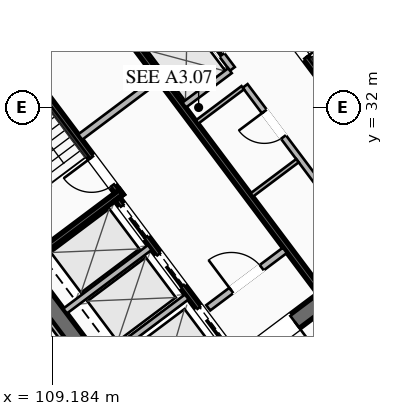
"""IFC4 building model, lengths in metres.
Left out: names, types, materials, properties, quantities, classifications, styles, units other than length and angle.
Written with IfcOpenShell. Run it as: python <this file> out.ifc"""

import sys

from ifc_helpers import new_model, si_unit, direction, frame, frame_2d, origin, place, context, subcontext, project, spatial, rectangle, extrude, element, fill, save


model = new_model("IFC4")
c1 = context("Model", 3, precision=1e-05, world=origin(), true_north=direction((0.0, 1.0)))
c2 = subcontext(c1, "Body", "Model", "MODEL_VIEW")
j1 = project(units=[si_unit("LENGTHUNIT", "METRE"), si_unit("PLANEANGLEUNIT", "RADIAN")], contexts=[c1])
p1 = place(None, origin())
s1 = spatial("IfcSite", under=j1, at=p1, CompositionType="ELEMENT")
p2 = place(p1, origin())
s2 = spatial("IfcBuilding", under=s1, at=p2, CompositionType="ELEMENT")
p3 = place(p2, frame((0.0, 0.0, 178.3)))
s3 = spatial("IfcBuildingStorey", under=s2, at=p3, CompositionType="ELEMENT", Elevation=178.3)
for number, where, z_axis, x_axis in (
    (1, (112.436, 21.077, 0.0), (0.0, 0.0, 1.0), (-0.6, 0.8, 0.0)),
    (2, (115.564, 42.923, 0.0), (0.0, 0.0, 1.0), (0.6, -0.8, 0.0)),
):
    element("IfcWall", number, at=place(p3, frame(where, z_axis=z_axis, x_axis=x_axis)), inside=s3, PredefinedType="SHEAR", context=c2, shape_type="SweptSolid", body=[
        extrude(rectangle(XDim=15.6, YDim=0.55, at=frame_2d((7.8, 0.0))), origin(), (0.0, 0.0, 1.0), 3.55),
    ])
p4 = place(p3, frame((124.539, 30.498, 0.0), z_axis=(0.0, 0.0, 1.0), x_axis=(-0.799998054672, -0.600002593761, 0.0)))
e3 = element("IfcWall", 3, at=p4, inside=s3, PredefinedType="SHEAR", context=c2, shape_type="SweptSolid", body=[
    extrude(rectangle(XDim=15.06, YDim=0.55, at=frame_2d((7.53, 0.0))), origin(), (0.0, 0.0, 1.0), 3.55),
])
p5 = place(p4, frame((9.23, 0.0, 0.0)))
e4 = element("IfcOpeningElement", 4, at=p5, cuts=e3, PredefinedType="OPENING", context=c2, shape_type="SweptSolid", body=[
    extrude(rectangle(XDim=1.25, YDim=2.25, at=frame_2d((0.625, 1.125))), frame((0.0, 0.285, 0.0), z_axis=(0.0, -1.0, 0.0), x_axis=(1.0, 0.0, 0.0)), (0.0, 0.0, 1.0), 0.57),
])
p6 = place(p4, frame((4.18, 0.0, 0.0)))
e5 = element("IfcOpeningElement", 5, at=p6, cuts=e3, PredefinedType="OPENING", context=c2, shape_type="SweptSolid", body=[
    extrude(rectangle(XDim=1.25, YDim=2.25, at=frame_2d((0.625, 1.125))), frame((0.0, 0.285, 0.0), z_axis=(0.0, -1.0, 0.0), x_axis=(1.0, 0.0, 0.0)), (0.0, 0.0, 1.0), 0.57),
])
p7 = place(p3, frame((103.461, 33.502, 0.0), z_axis=(0.0, 0.0, 1.0), x_axis=(0.799998054672, 0.600002593761, 0.0)))
e6 = element("IfcWall", 6, at=p7, inside=s3, PredefinedType="SHEAR", context=c2, shape_type="SweptSolid", body=[
    extrude(rectangle(XDim=15.06, YDim=0.55, at=frame_2d((7.53, 0.0))), origin(), (0.0, 0.0, 1.0), 3.55),
])
p8 = place(p7, frame((4.58, 0.0, 0.0)))
e7 = element("IfcOpeningElement", 7, at=p8, cuts=e6, PredefinedType="OPENING", context=c2, shape_type="SweptSolid", body=[
    extrude(rectangle(XDim=1.25, YDim=2.25, at=frame_2d((0.625, 1.125))), frame((0.0, 0.285, 0.0), z_axis=(0.0, -1.0, 0.0), x_axis=(1.0, 0.0, 0.0)), (0.0, 0.0, 1.0), 0.57),
])
p9 = place(p7, frame((9.63, 0.0, 0.0)))
e8 = element("IfcOpeningElement", 8, at=p9, cuts=e6, PredefinedType="OPENING", context=c2, shape_type="SweptSolid", body=[
    extrude(rectangle(XDim=1.25, YDim=2.25, at=frame_2d((0.625, 1.125))), frame((0.0, 0.285, 0.0), z_axis=(0.0, -1.0, 0.0), x_axis=(1.0, 0.0, 0.0)), (0.0, 0.0, 1.0), 0.57),
])
p10 = place(p3, frame((111.44, 29.08, 0.0), z_axis=(0.0, 0.0, 1.0), x_axis=(-0.59999029481, 0.8000072788, 0.0)))
e9 = element("IfcWall", 9, at=p10, inside=s3, PredefinedType="SHEAR", context=c2, shape_type="SweptSolid", body=[
    extrude(rectangle(XDim=8.05, YDim=0.2, at=frame_2d((4.025, 0.0))), origin(), (0.0, 0.0, 1.0), 3.37),
])
p11 = place(p10, frame((0.45, 0.0, 0.0)))
e10 = element("IfcOpeningElement", 10, at=p11, cuts=e9, PredefinedType="OPENING", context=c2, shape_type="SweptSolid", body=[
    extrude(rectangle(XDim=1.15, YDim=2.2, at=frame_2d((0.575, 1.1))), frame((0.0, 0.11, 0.0), z_axis=(0.0, -1.0, 0.0), x_axis=(1.0, 0.0, 0.0)), (0.0, 0.0, 1.0), 0.22),
])
p12 = place(p3, frame((108.396, 26.922, 0.0), z_axis=(0.0, 0.0, 1.0), x_axis=(0.800015298837, 0.599979601008, 0.0)))
e11 = element("IfcWall", 11, at=p12, inside=s3, PredefinedType="SHEAR", context=c2, shape_type="SweptSolid", body=[
    extrude(rectangle(XDim=3.83, YDim=0.2, at=frame_2d((1.915, 0.0))), origin(), (0.0, 0.0, 1.0), 3.37),
])
p13 = place(p3, frame((116.56, 34.92, 0.0), z_axis=(0.0, 0.0, 1.0), x_axis=(0.59999029481, -0.8000072788, 0.0)))
e12 = element("IfcWall", 12, at=p13, inside=s3, PredefinedType="SHEAR", context=c2, shape_type="SweptSolid", body=[
    extrude(rectangle(XDim=8.05, YDim=0.2, at=frame_2d((4.025, 0.0))), origin(), (0.0, 0.0, 1.0), 3.37),
])
p14 = place(p13, frame((0.45, 0.0, 0.0)))
e13 = element("IfcOpeningElement", 13, at=p14, cuts=e12, PredefinedType="OPENING", context=c2, shape_type="SweptSolid", body=[
    extrude(rectangle(XDim=1.15, YDim=2.2, at=frame_2d((0.575, 1.1))), frame((0.0, 0.11, 0.0), z_axis=(0.0, -1.0, 0.0), x_axis=(1.0, 0.0, 0.0)), (0.0, 0.0, 1.0), 0.22),
])
p15 = place(p3, frame((117.998, 25.936, 0.0), z_axis=(0.0, 0.0, 1.0), x_axis=(-0.600002693989, 0.799997979501, 0.0)))
e14 = element("IfcWall", 14, at=p15, inside=s3, PredefinedType="SHEAR", context=c2, shape_type="SweptSolid", body=[
    extrude(rectangle(XDim=14.5, YDim=0.2, at=frame_2d((7.25, 0.0))), origin(), (0.0, 0.0, 1.0), 3.37),
])
p16 = place(p3, frame((110.104, 31.028, 0.0), z_axis=(0.0, 0.0, 1.0), x_axis=(0.800018601094, 0.59997519774, 0.0)))
e15 = element("IfcWall", 15, at=p16, inside=s3, PredefinedType="SOLIDWALL", context=c2, shape_type="SweptSolid", body=[
    extrude(rectangle(XDim=3.15, YDim=0.22, at=frame_2d((1.575, 0.0))), origin(), (0.0, 0.0, 1.0), 2.723),
])
p17 = place(p3, frame((114.316, 25.412, 0.0), z_axis=(0.0, 0.0, 1.0), x_axis=(0.800018601094, 0.59997519774, 0.0)))
e16 = element("IfcWall", 16, at=p17, inside=s3, PredefinedType="SOLIDWALL", context=c2, shape_type="SweptSolid", body=[
    extrude(rectangle(XDim=3.15, YDim=0.22, at=frame_2d((1.575, 0.0))), origin(), (0.0, 0.0, 1.0), 2.723),
])
p18 = place(p17, frame((0.95, 0.0, 0.0)))
e17 = element("IfcOpeningElement", 17, at=p18, cuts=e16, PredefinedType="OPENING", context=c2, shape_type="SweptSolid", body=[
    extrude(rectangle(XDim=1.25, YDim=2.25, at=frame_2d((0.625, 1.125))), frame((0.0, 0.12, 0.0), z_axis=(0.0, -1.0, 0.0), x_axis=(1.0, 0.0, 0.0)), (0.0, 0.0, 1.0), 0.24),
])
p19 = place(p3, frame((115.19, 23.83, 0.0), z_axis=(0.0, 0.0, 1.0), x_axis=(-0.599993943644, 0.800004542231, 0.0)))
e18 = element("IfcWall", 18, at=p19, inside=s3, PredefinedType="SHEAR", context=c2, shape_type="SweptSolid", body=[
    extrude(rectangle(XDim=6.45, YDim=0.2, at=frame_2d((3.225, 0.0))), origin(), (0.0, 0.0, 1.0), 3.37),
])
p20 = place(p19, frame((4.875, 0.0, 0.0)))
e19 = element("IfcOpeningElement", 19, at=p20, cuts=e18, PredefinedType="OPENING", context=c2, shape_type="SweptSolid", body=[
    extrude(rectangle(XDim=1.3, YDim=2.25, at=frame_2d((0.65, 1.125))), frame((0.0, 0.11, 0.0), z_axis=(0.0, -1.0, 0.0), x_axis=(1.0, 0.0, 0.0)), (0.0, 0.0, 1.0), 0.22),
])
p21 = place(p19, frame((2.875, 0.0, 0.0)))
e20 = element("IfcOpeningElement", 20, at=p21, cuts=e18, PredefinedType="OPENING", context=c2, shape_type="SweptSolid", body=[
    extrude(rectangle(XDim=1.3, YDim=2.25, at=frame_2d((0.65, 1.125))), frame((0.0, 0.11, 0.0), z_axis=(0.0, -1.0, 0.0), x_axis=(1.0, 0.0, 0.0)), (0.0, 0.0, 1.0), 0.22),
])
p22 = place(p19, frame((0.675, 0.0, 0.0)))
e21 = element("IfcOpeningElement", 21, at=p22, cuts=e18, PredefinedType="OPENING", context=c2, shape_type="SweptSolid", body=[
    extrude(rectangle(XDim=1.3, YDim=2.25, at=frame_2d((0.65, 1.125))), frame((0.0, 0.11, 0.0), z_axis=(0.0, -1.0, 0.0), x_axis=(1.0, 0.0, 0.0)), (0.0, 0.0, 1.0), 0.22),
])
for number, where, z_axis, x_axis in (
    (22, (110.826, 23.682, 0.0), (0.0, 0.0, 1.0), (0.8, 0.6, 0.0)),
    (23, (109.608, 25.306, 0.0), (0.0, 0.0, 1.0), (0.8, 0.6, 0.0)),
):
    element("IfcWall", number, at=place(p3, frame(where, z_axis=z_axis, x_axis=x_axis)), inside=s3, PredefinedType="SOLIDWALL", context=c2, shape_type="SweptSolid", body=[
        extrude(rectangle(XDim=3.48, YDim=0.2, at=frame_2d((1.74, 0.0))), origin(), (0.0, 0.0, 1.0), 3.37),
    ])
p23 = place(p3, frame((119.67, 27.19, 0.0), z_axis=(0.0, 0.0, 1.0), x_axis=(-0.599988677396, 0.800008491828, 0.0)))
e24 = element("IfcWall", 24, at=p23, inside=s3, PredefinedType="SOLIDWALL", context=c2, shape_type="SweptSolid", body=[
    extrude(rectangle(XDim=6.9, YDim=0.2, at=frame_2d((3.45, 0.0))), origin(), (0.0, 0.0, 1.0), 2.723),
])
p24 = place(p23, frame((0.85, 0.0, 0.0)))
e25 = element("IfcOpeningElement", 25, at=p24, cuts=e24, PredefinedType="OPENING", context=c2, shape_type="SweptSolid", body=[
    extrude(rectangle(XDim=0.95, YDim=2.05, at=frame_2d((0.475, 1.025))), frame((0.0, 0.11, 0.0), z_axis=(0.0, -1.0, 0.0), x_axis=(1.0, 0.0, 0.0)), (0.0, 0.0, 1.0), 0.22),
])
p25 = place(p23, frame((4.8, 0.0, 0.0)))
e26 = element("IfcOpeningElement", 26, at=p25, cuts=e24, PredefinedType="OPENING", context=c2, shape_type="SweptSolid", body=[
    extrude(rectangle(XDim=1.05, YDim=2.2, at=frame_2d((0.525, 1.1))), frame((0.0, 0.11, 0.0), z_axis=(0.0, -1.0, 0.0), x_axis=(1.0, 0.0, 0.0)), (0.0, 0.0, 1.0), 0.22),
])
for number, where, z_axis, x_axis in (
    (27, (113.946, 31.522, 0.0), (0.0, 0.0, 1.0), (0.8, 0.6, 0.0)),
    (28, (115.746, 29.122, 0.0), (0.0, 0.0, 1.0), (0.8, 0.6, 0.0)),
):
    element("IfcWall", number, at=place(p3, frame(where, z_axis=z_axis, x_axis=x_axis)), inside=s3, PredefinedType="PARTITIONING", context=c2, shape_type="SweptSolid", body=[
        extrude(rectangle(XDim=1.88, YDim=0.135, at=frame_2d((0.94, 0.0))), origin(), (0.0, 0.0, 1.0), 2.723),
    ])
p26 = place(p3, frame((115.11, 33.27, 0.0), z_axis=(0.0, 0.0, 1.0), x_axis=(-0.600011322243, 0.799991508192, 0.0)))
e29 = element("IfcWall", 29, at=p26, inside=s3, PredefinedType="SOLIDWALL", context=c2, shape_type="SweptSolid", body=[
    extrude(rectangle(XDim=6.9, YDim=0.2, at=frame_2d((3.45, 0.0))), origin(), (0.0, 0.0, 1.0), 3.37),
])
p27 = place(p26, frame((0.575, 0.0, 0.0)))
e30 = element("IfcOpeningElement", 30, at=p27, cuts=e29, PredefinedType="OPENING", context=c2, shape_type="SweptSolid", body=[
    extrude(rectangle(XDim=1.1, YDim=2.2, at=frame_2d((0.55, 1.1))), frame((0.0, 0.11, 0.0), z_axis=(0.0, -1.0, 0.0), x_axis=(1.0, 0.0, 0.0)), (0.0, 0.0, 1.0), 0.22),
])
p28 = place(p26, frame((2.825, 0.0, 0.0)))
e31 = element("IfcOpeningElement", 31, at=p28, cuts=e29, PredefinedType="OPENING", context=c2, shape_type="SweptSolid", body=[
    extrude(rectangle(XDim=1.1, YDim=2.2, at=frame_2d((0.55, 1.1))), frame((0.0, 0.11, 0.0), z_axis=(0.0, -1.0, 0.0), x_axis=(1.0, 0.0, 0.0)), (0.0, 0.0, 1.0), 0.22),
])
p29 = place(p26, frame((5.075, 0.0, 0.0)))
e32 = element("IfcOpeningElement", 32, at=p29, cuts=e29, PredefinedType="OPENING", context=c2, shape_type="SweptSolid", body=[
    extrude(rectangle(XDim=1.1, YDim=2.2, at=frame_2d((0.55, 1.1))), frame((0.0, 0.11, 0.0), z_axis=(0.0, -1.0, 0.0), x_axis=(1.0, 0.0, 0.0)), (0.0, 0.0, 1.0), 0.22),
])
p30 = place(p3, frame((113.526, 32.082, 0.0), z_axis=(0.0, 0.0, 1.0), x_axis=(0.800046745961, 0.599937666993, 0.0)))
e33 = element("IfcWall", 33, at=p30, inside=s3, PredefinedType="SOLIDWALL", context=c2, shape_type="SweptSolid", body=[
    extrude(rectangle(XDim=1.88, YDim=0.2, at=frame_2d((0.94, 0.0))), origin(), (0.0, 0.0, 1.0), 3.37),
])
p31 = place(p3, frame((112.176, 33.882, 0.0), z_axis=(0.0, 0.0, 1.0), x_axis=(0.8, 0.6, 0.0)))
e34 = element("IfcWall", 34, at=p31, inside=s3, PredefinedType="SOLIDWALL", context=c2, shape_type="SweptSolid", body=[
    extrude(rectangle(XDim=1.88, YDim=0.2, at=frame_2d((0.94, 0.0))), origin(), (0.0, 0.0, 1.0), 3.37),
])
p32 = place(p3, frame((96.658, 31.206, 0.0), z_axis=(0.0, 0.0, 1.0), x_axis=(0.8, 0.6, 0.0)))
e35 = element("IfcWall", 35, at=p32, inside=s3, PredefinedType="PARTITIONING", context=c2, shape_type="SweptSolid", body=[
    extrude(rectangle(XDim=28.7, YDim=0.135, at=frame_2d((14.35, 0.0))), origin(), (0.0, 0.0, 1.0), 2.723),
])
p33 = place(p32, frame((0.3, 0.0, 0.0)))
e36 = element("IfcOpeningElement", 36, at=p33, cuts=e35, PredefinedType="OPENING", context=c2, shape_type="SweptSolid", body=[
    extrude(rectangle(XDim=0.95, YDim=2.05, at=frame_2d((0.475, 1.025))), frame((0.0, 0.077, 0.0), z_axis=(0.0, -1.0, 0.0), x_axis=(1.0, 0.0, 0.0)), (0.0, 0.0, 1.0), 0.155),
])
p34 = place(p32, frame((9.959, 0.0, 0.0)))
e37 = element("IfcOpeningElement", 37, at=p34, cuts=e35, PredefinedType="OPENING", context=c2, shape_type="SweptSolid", body=[
    extrude(rectangle(XDim=0.95, YDim=2.05, at=frame_2d((0.475, 1.025))), frame((0.0, 0.077, 0.0), z_axis=(0.0, -1.0, 0.0), x_axis=(1.0, 0.0, 0.0)), (0.0, 0.0, 1.0), 0.155),
])
p35 = place(p32, frame((14.005, 0.0, 0.0)))
e38 = element("IfcOpeningElement", 38, at=p35, cuts=e35, PredefinedType="OPENING", context=c2, shape_type="SweptSolid", body=[
    extrude(rectangle(XDim=0.95, YDim=2.05, at=frame_2d((0.475, 1.025))), frame((0.0, 0.077, 0.0), z_axis=(0.0, -1.0, 0.0), x_axis=(1.0, 0.0, 0.0)), (0.0, 0.0, 1.0), 0.155),
])
p36 = place(p32, frame((18.049, 0.0, 0.0)))
e39 = element("IfcOpeningElement", 39, at=p36, cuts=e35, PredefinedType="OPENING", context=c2, shape_type="SweptSolid", body=[
    extrude(rectangle(XDim=0.95, YDim=2.05, at=frame_2d((0.475, 1.025))), frame((0.0, 0.077, 0.0), z_axis=(0.0, -1.0, 0.0), x_axis=(1.0, 0.0, 0.0)), (0.0, 0.0, 1.0), 0.155),
])
p37 = place(p32, frame((27.45, 0.0, 0.0)))
e40 = element("IfcOpeningElement", 40, at=p37, cuts=e35, PredefinedType="OPENING", context=c2, shape_type="SweptSolid", body=[
    extrude(rectangle(XDim=0.95, YDim=2.05, at=frame_2d((0.475, 1.025))), frame((0.0, 0.077, 0.0), z_axis=(0.0, -1.0, 0.0), x_axis=(1.0, 0.0, 0.0)), (0.0, 0.0, 1.0), 0.155),
])
p38 = place(p3, frame((131.78, 32.21, 0.0), z_axis=(0.0, 0.0, 1.0), x_axis=(-0.8, -0.6, 0.0)))
e41 = element("IfcWall", 41, at=p38, inside=s3, PredefinedType="PARTITIONING", context=c2, shape_type="SweptSolid", body=[
    extrude(rectangle(XDim=28.7, YDim=0.135, at=frame_2d((14.35, 0.0))), origin(), (0.0, 0.0, 1.0), 2.723),
])
p39 = place(p38, frame((27.37, 0.0, 0.0)))
e42 = element("IfcOpeningElement", 42, at=p39, cuts=e41, PredefinedType="OPENING", context=c2, shape_type="SweptSolid", body=[
    extrude(rectangle(XDim=0.95, YDim=2.05, at=frame_2d((0.475, 1.025))), frame((0.0, 0.077, 0.0), z_axis=(0.0, -1.0, 0.0), x_axis=(1.0, 0.0, 0.0)), (0.0, 0.0, 1.0), 0.155),
])
p40 = place(p38, frame((13.592, 0.0, 0.0)))
e43 = element("IfcOpeningElement", 43, at=p40, cuts=e41, PredefinedType="OPENING", context=c2, shape_type="SweptSolid", body=[
    extrude(rectangle(XDim=0.95, YDim=2.05, at=frame_2d((0.475, 1.025))), frame((0.0, 0.077, 0.0), z_axis=(0.0, -1.0, 0.0), x_axis=(1.0, 0.0, 0.0)), (0.0, 0.0, 1.0), 0.155),
])
p41 = place(p38, frame((0.38, 0.0, 0.0)))
e44 = element("IfcOpeningElement", 44, at=p41, cuts=e41, PredefinedType="OPENING", context=c2, shape_type="SweptSolid", body=[
    extrude(rectangle(XDim=0.95, YDim=2.05, at=frame_2d((0.475, 1.025))), frame((0.0, 0.077, 0.0), z_axis=(0.0, -1.0, 0.0), x_axis=(1.0, 0.0, 0.0)), (0.0, 0.0, 1.0), 0.155),
])
p42 = place(p3, frame((112.104, 20.928, 0.0), z_axis=(0.0, 0.0, 1.0), x_axis=(-0.599994940075, 0.800003794918, 0.0)))
e45 = element("IfcWall", 45, at=p42, inside=s3, PredefinedType="PARTITIONING", context=c2, shape_type="SweptSolid", body=[
    extrude(rectangle(XDim=15.44, YDim=0.135, at=frame_2d((7.72, 0.0))), origin(), (0.0, 0.0, 1.0), 2.723),
])
p43 = place(p5, origin())
e46 = element("IfcDoor", 46, at=p43, inside=s3, OperationType="SINGLE_SWING_LEFT", PredefinedType="DOOR", context=c2, shape_type="SweptSolid", body=[
    extrude(rectangle(XDim=1.25, YDim=2.25, at=frame_2d((0.625, 1.125))), frame((0.0, 0.025, 0.0), z_axis=(0.0, -1.0, 0.0), x_axis=(1.0, 0.0, 0.0)), (0.0, 0.0, 1.0), 0.05),
])
fill(e4, e46)
p44 = place(p11, origin())
e47 = element("IfcDoor", 47, at=p44, inside=s3, OperationType="SINGLE_SWING_RIGHT", PredefinedType="DOOR", context=c2, shape_type="SweptSolid", body=[
    extrude(rectangle(XDim=1.15, YDim=2.2, at=frame_2d((0.575, 1.1))), frame((0.0, 0.025, 0.0), z_axis=(0.0, -1.0, 0.0), x_axis=(1.0, 0.0, 0.0)), (0.0, 0.0, 1.0), 0.05),
])
fill(e10, e47)
p45 = place(p14, origin())
e48 = element("IfcDoor", 48, at=p45, inside=s3, OperationType="SINGLE_SWING_RIGHT", PredefinedType="DOOR", context=c2, shape_type="SweptSolid", body=[
    extrude(rectangle(XDim=1.15, YDim=2.2, at=frame_2d((0.575, 1.1))), frame((0.0, 0.025, 0.0), z_axis=(0.0, -1.0, 0.0), x_axis=(1.0, 0.0, 0.0)), (0.0, 0.0, 1.0), 0.05),
])
fill(e13, e48)
p46 = place(p18, origin())
e49 = element("IfcDoor", 49, at=p46, inside=s3, OperationType="SINGLE_SWING_LEFT", PredefinedType="DOOR", context=c2, shape_type="SweptSolid", body=[
    extrude(rectangle(XDim=1.25, YDim=2.25, at=frame_2d((0.625, 1.125))), frame((0.0, 0.025, 0.0), z_axis=(0.0, -1.0, 0.0), x_axis=(1.0, 0.0, 0.0)), (0.0, 0.0, 1.0), 0.05),
])
fill(e17, e49)
p47 = place(p25, origin())
e50 = element("IfcDoor", 50, at=p47, inside=s3, OperationType="SINGLE_SWING_RIGHT", PredefinedType="DOOR", context=c2, shape_type="SweptSolid", body=[
    extrude(rectangle(XDim=1.05, YDim=2.2, at=frame_2d((0.525, 1.1))), frame((0.0, 0.025, 0.0), z_axis=(0.0, -1.0, 0.0), x_axis=(1.0, 0.0, 0.0)), (0.0, 0.0, 1.0), 0.05),
])
fill(e26, e50)
p48 = place(p20, origin())
e51 = element("IfcDoor", 51, at=p48, inside=s3, OperationType="SLIDING_TO_LEFT", PredefinedType="DOOR", context=c2, shape_type="SweptSolid", body=[
    extrude(rectangle(XDim=1.3, YDim=2.25, at=frame_2d((0.65, 1.125))), frame((0.0, 0.025, 0.0), z_axis=(0.0, -1.0, 0.0), x_axis=(1.0, 0.0, 0.0)), (0.0, 0.0, 1.0), 0.05),
])
fill(e19, e51)
p49 = place(p21, origin())
e52 = element("IfcDoor", 52, at=p49, inside=s3, OperationType="SLIDING_TO_LEFT", PredefinedType="DOOR", context=c2, shape_type="SweptSolid", body=[
    extrude(rectangle(XDim=1.3, YDim=2.25, at=frame_2d((0.65, 1.125))), frame((0.0, 0.025, 0.0), z_axis=(0.0, -1.0, 0.0), x_axis=(1.0, 0.0, 0.0)), (0.0, 0.0, 1.0), 0.05),
])
fill(e20, e52)
p50 = place(p22, origin())
e53 = element("IfcDoor", 53, at=p50, inside=s3, OperationType="SLIDING_TO_LEFT", PredefinedType="DOOR", context=c2, shape_type="SweptSolid", body=[
    extrude(rectangle(XDim=1.3, YDim=2.25, at=frame_2d((0.65, 1.125))), frame((0.0, 0.025, 0.0), z_axis=(0.0, -1.0, 0.0), x_axis=(1.0, 0.0, 0.0)), (0.0, 0.0, 1.0), 0.05),
])
fill(e21, e53)
p51 = place(p27, origin())
e54 = element("IfcDoor", 54, at=p51, inside=s3, OperationType="SLIDING_TO_LEFT", PredefinedType="DOOR", context=c2, shape_type="SweptSolid", body=[
    extrude(rectangle(XDim=1.1, YDim=2.2, at=frame_2d((0.55, 1.1))), frame((0.0, 0.025, 0.0), z_axis=(0.0, -1.0, 0.0), x_axis=(1.0, 0.0, 0.0)), (0.0, 0.0, 1.0), 0.05),
])
fill(e30, e54)
save(model, sys.argv[1])
